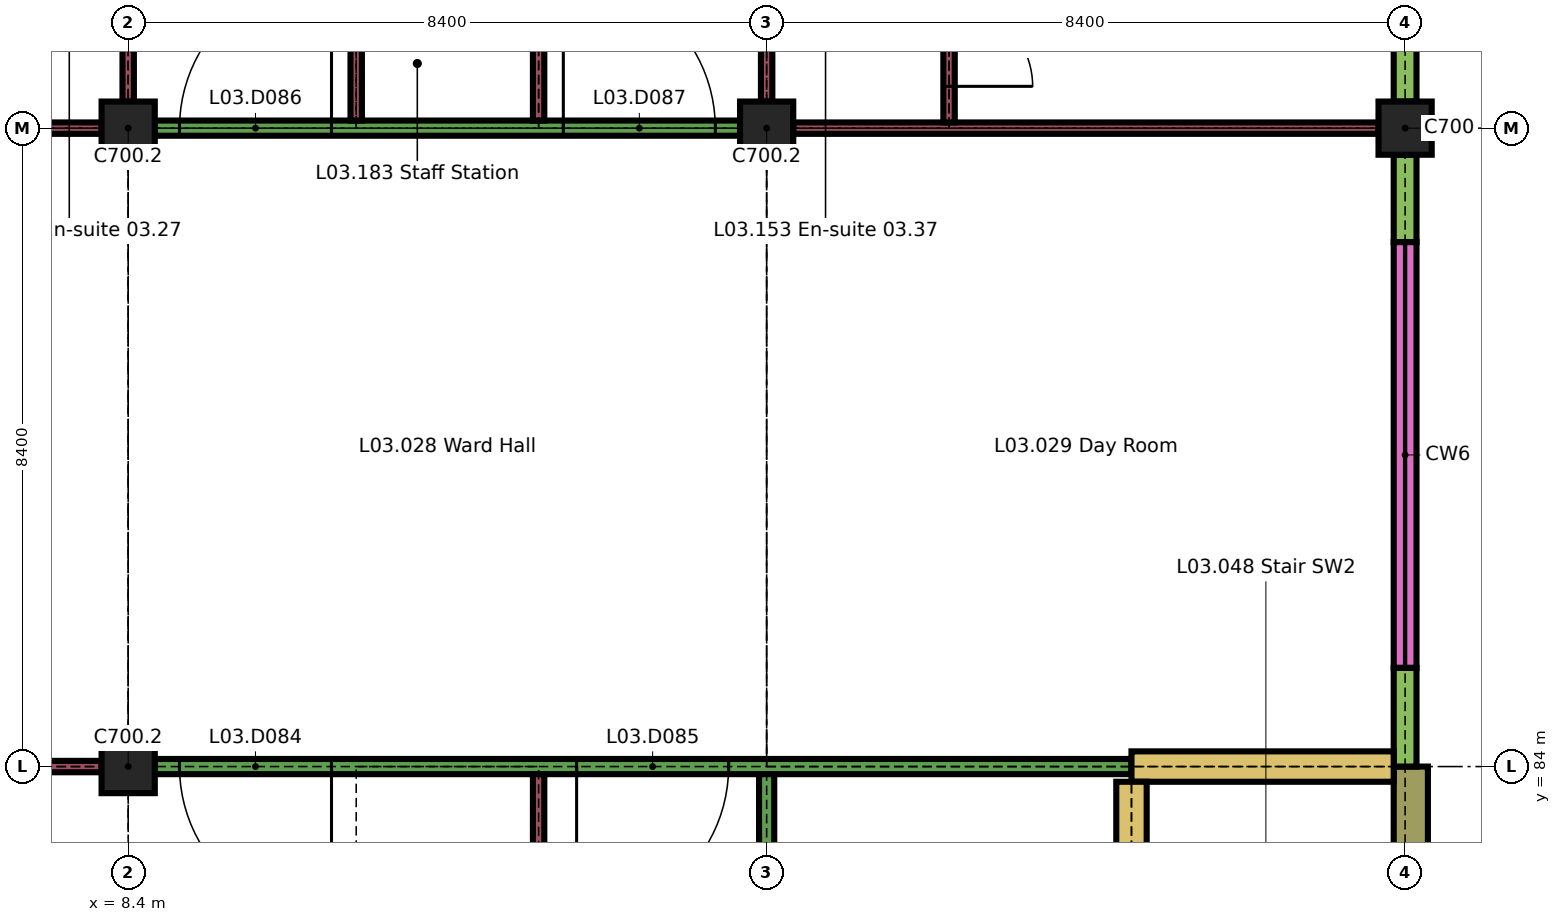
"""IFC4 building model, lengths in metres.
Left out: names, types, materials, properties, quantities, classifications, styles, units other than length and angle.
Written with IfcOpenShell. Run it as: python <this file> out.ifc"""

import sys

from ifc_helpers import new_model, si_unit, direction, frame, frame_2d, origin, origin_2d, place, context, subcontext, project, spatial, rectangle, extrude, element, fill, save


model = new_model("IFC4")
c1 = context("Model", 3, precision=1e-05, world=origin(), true_north=direction((0.0, 1.0)))
c2 = subcontext(c1, "Body", "Model", "MODEL_VIEW")
j1 = project(units=[si_unit("LENGTHUNIT", "METRE"), si_unit("PLANEANGLEUNIT", "RADIAN")], contexts=[c1])
p1 = place(None, origin())
s1 = spatial("IfcSite", under=j1, at=p1, CompositionType="ELEMENT")
p2 = place(p1, origin())
s2 = spatial("IfcBuilding", under=s1, at=p2, CompositionType="ELEMENT")
p3 = place(p2, frame((0.0, 0.0, 15.3)))
s3 = spatial("IfcBuildingStorey", under=s2, at=p3, CompositionType="ELEMENT", Elevation=15.3)
for number, where, z_axis, x_axis in (
    (1, (8.4, 84.0, 0.0), (0.0, 0.0, 1.0), (1.0, 0.0, 0.0)),
    (2, (8.4, 92.4, 0.0), (0.0, 0.0, 1.0), (1.0, 0.0, 0.0)),
    (3, (16.8, 92.4, 0.0), (0.0, 0.0, 1.0), (1.0, 0.0, 0.0)),
    (4, (25.2, 92.4, 0.0), (0.0, 0.0, 1.0), (1.0, 0.0, 0.0)),
):
    element("IfcColumn", number, at=place(p3, frame(where, z_axis=z_axis, x_axis=x_axis)), inside=s3, PredefinedType="COLUMN", context=c2, shape_type="SweptSolid", body=[
        extrude(rectangle(XDim=0.7, YDim=0.7, at=origin_2d()), origin(), (0.0, 0.0, 1.0), 3.26),
    ])
p4 = place(p3, frame((25.275, 80.15, 0.0), z_axis=(0.0, 0.0, 1.0), x_axis=(0.0, 1.0, 0.0)))
e5 = element("IfcWall", 5, at=p4, inside=s3, PredefinedType="SOLIDWALL", context=c2, shape_type="SweptSolid", body=[
    extrude(rectangle(XDim=3.85, YDim=0.45, at=frame_2d((1.925, 0.0))), origin(), (0.0, 0.0, 1.0), 3.26),
])
p5 = place(p3, frame((25.2, 84.0, 0.0), z_axis=(0.0, 0.0, 1.0), x_axis=(0.0, 1.0, 0.0)))
e6 = element("IfcWall", 6, at=p5, inside=s3, PredefinedType="SOLIDWALL", context=c2, shape_type="SweptSolid", body=[
    extrude(rectangle(XDim=1.3, YDim=0.3, at=frame_2d((0.65, 0.0))), origin(), (0.0, 0.0, 1.0), 2.96),
])
p6 = place(p3, frame((25.2, 90.9, 0.0), z_axis=(0.0, 0.0, 1.0), x_axis=(0.0, 1.0, 0.0)))
e7 = element("IfcWall", 7, at=p6, inside=s3, PredefinedType="SOLIDWALL", context=c2, shape_type="SweptSolid", body=[
    extrude(rectangle(XDim=1.15, YDim=0.3, at=frame_2d((0.575, 0.0))), origin(), (0.0, 0.0, 1.0), 2.96),
])
p7 = place(p3, frame((25.2, 85.3, 0.0), z_axis=(0.0, 0.0, 1.0), x_axis=(0.0, 1.0, 0.0)))
e8 = element("IfcWall", 8, at=p7, inside=s3, PredefinedType="SOLIDWALL", context=c2, shape_type="SweptSolid", body=[
    extrude(rectangle(XDim=5.6, YDim=0.3, at=frame_2d((2.8, 0.0))), origin(), (0.0, 0.0, 1.0), 0.6),
])
p8 = place(p3, frame((25.2, 92.75, 0.0), z_axis=(0.0, 0.0, 1.0), x_axis=(0.0, 1.0, 0.0)))
e9 = element("IfcWall", 9, at=p8, inside=s3, PredefinedType="SOLIDWALL", context=c2, shape_type="SweptSolid", body=[
    extrude(rectangle(XDim=3.85, YDim=0.3, at=frame_2d((1.925, 0.0))), origin(), (0.0, 0.0, 1.0), 2.96),
])
p9 = place(p8, frame((0.7, 0.0, 0.9)))
e10 = element("IfcOpeningElement", 10, at=p9, cuts=e9, PredefinedType="OPENING", context=c2, shape_type="SweptSolid", body=[
    extrude(rectangle(XDim=2.1, YDim=1.5, at=frame_2d((1.05, 0.75))), frame((0.0, 0.16, 0.0), z_axis=(0.0, -1.0, 0.0), x_axis=(1.0, 0.0, 0.0)), (0.0, 0.0, 1.0), 0.32),
])
p10 = place(p3, frame((0.35, 84.0, 0.0), z_axis=(0.0, 0.0, 1.0), x_axis=(1.0, 0.0, 0.0)))
e11 = element("IfcWall", 11, at=p10, inside=s3, PredefinedType="PARTITIONING", context=c2, shape_type="SweptSolid", body=[
    extrude(rectangle(XDim=7.7, YDim=0.15, at=frame_2d((3.85, 0.0))), origin(), (0.0, 0.0, 1.0), 3.26),
])
p11 = place(p3, frame((8.75, 84.0, 0.0), z_axis=(0.0, 0.0, 1.0), x_axis=(1.0, 0.0, 0.0)))
e12 = element("IfcWall", 12, at=p11, inside=s3, PredefinedType="PARTITIONING", context=c2, shape_type="SweptSolid", body=[
    extrude(rectangle(XDim=12.85, YDim=0.2, at=frame_2d((6.425, 0.0))), origin(), (0.0, 0.0, 1.0), 3.26),
])
p12 = place(p11, frame((0.325, 0.0, 0.0)))
e13 = element("IfcOpeningElement", 13, at=p12, cuts=e12, PredefinedType="OPENING", context=c2, shape_type="SweptSolid", body=[
    extrude(rectangle(XDim=2.0, YDim=2.4, at=frame_2d((1.0, 1.2))), frame((0.0, 0.11, 0.0), z_axis=(0.0, -1.0, 0.0), x_axis=(1.0, 0.0, 0.0)), (0.0, 0.0, 1.0), 0.22),
])
p13 = place(p11, frame((5.55, 0.0, 0.0)))
e14 = element("IfcOpeningElement", 14, at=p13, cuts=e12, PredefinedType="OPENING", context=c2, shape_type="SweptSolid", body=[
    extrude(rectangle(XDim=2.0, YDim=2.4, at=frame_2d((1.0, 1.2))), frame((0.0, 0.11, 0.0), z_axis=(0.0, -1.0, 0.0), x_axis=(1.0, 0.0, 0.0)), (0.0, 0.0, 1.0), 0.22),
])
p14 = place(p3, frame((21.6, 84.0, 0.0), z_axis=(0.0, 0.0, 1.0), x_axis=(1.0, 0.0, 0.0)))
e15 = element("IfcWall", 15, at=p14, inside=s3, PredefinedType="SHEAR", context=c2, shape_type="SweptSolid", body=[
    extrude(rectangle(XDim=3.45, YDim=0.4, at=frame_2d((1.725, 0.0))), origin(), (0.0, 0.0, 1.0), 3.26),
])
p15 = place(p3, frame((0.35, 92.4, 0.0), z_axis=(0.0, 0.0, 1.0), x_axis=(1.0, 0.0, 0.0)))
e16 = element("IfcWall", 16, at=p15, inside=s3, PredefinedType="PARTITIONING", context=c2, shape_type="SweptSolid", body=[
    extrude(rectangle(XDim=7.7, YDim=0.15, at=frame_2d((3.85, 0.0))), origin(), (0.0, 0.0, 1.0), 3.26),
])
p16 = place(p3, frame((8.75, 92.4, 0.0), z_axis=(0.0, 0.0, 1.0), x_axis=(1.0, 0.0, 0.0)))
e17 = element("IfcWall", 17, at=p16, inside=s3, PredefinedType="PARTITIONING", context=c2, shape_type="SweptSolid", body=[
    extrude(rectangle(XDim=7.7, YDim=0.2, at=frame_2d((3.85, 0.0))), origin(), (0.0, 0.0, 1.0), 3.26),
])
p17 = place(p16, frame((0.325, 0.0, 0.0)))
e18 = element("IfcOpeningElement", 18, at=p17, cuts=e17, PredefinedType="OPENING", context=c2, shape_type="SweptSolid", body=[
    extrude(rectangle(XDim=2.0, YDim=2.4, at=frame_2d((1.0, 1.2))), frame((0.0, 0.11, 0.0), z_axis=(0.0, -1.0, 0.0), x_axis=(1.0, 0.0, 0.0)), (0.0, 0.0, 1.0), 0.22),
])
p18 = place(p16, frame((5.375, 0.0, 0.0)))
e19 = element("IfcOpeningElement", 19, at=p18, cuts=e17, PredefinedType="OPENING", context=c2, shape_type="SweptSolid", body=[
    extrude(rectangle(XDim=2.0, YDim=2.4, at=frame_2d((1.0, 1.2))), frame((0.0, 0.11, 0.0), z_axis=(0.0, -1.0, 0.0), x_axis=(1.0, 0.0, 0.0)), (0.0, 0.0, 1.0), 0.22),
])
p19 = place(p3, frame((17.15, 92.4, 0.0), z_axis=(0.0, 0.0, 1.0), x_axis=(1.0, 0.0, 0.0)))
e20 = element("IfcWall", 20, at=p19, inside=s3, PredefinedType="PARTITIONING", context=c2, shape_type="SweptSolid", body=[
    extrude(rectangle(XDim=7.7, YDim=0.15, at=frame_2d((3.85, 0.0))), origin(), (0.0, 0.0, 1.0), 3.26),
])
p20 = place(p3, frame((8.4, 92.75, 0.0), z_axis=(0.0, 0.0, 1.0), x_axis=(0.0, 1.0, 0.0)))
e21 = element("IfcWall", 21, at=p20, inside=s3, PredefinedType="PARTITIONING", context=c2, shape_type="SweptSolid", body=[
    extrude(rectangle(XDim=7.7, YDim=0.15, at=frame_2d((3.85, 0.0))), origin(), (0.0, 0.0, 1.0), 3.26),
])
p21 = place(p20, frame((2.1, 0.0, 0.0)))
e22 = element("IfcOpeningElement", 22, at=p21, cuts=e21, PredefinedType="OPENING", context=c2, shape_type="SweptSolid", body=[
    extrude(rectangle(XDim=1.5, YDim=2.4, at=frame_2d((0.75, 1.2))), frame((0.0, 0.085, 0.0), z_axis=(0.0, -1.0, 0.0), x_axis=(1.0, 0.0, 0.0)), (0.0, 0.0, 1.0), 0.17),
])
p22 = place(p20, frame((4.1, 0.0, 0.0)))
e23 = element("IfcOpeningElement", 23, at=p22, cuts=e21, PredefinedType="OPENING", context=c2, shape_type="SweptSolid", body=[
    extrude(rectangle(XDim=1.5, YDim=2.4, at=frame_2d((0.75, 1.2))), frame((0.0, 0.085, 0.0), z_axis=(0.0, -1.0, 0.0), x_axis=(1.0, 0.0, 0.0)), (0.0, 0.0, 1.0), 0.17),
])
p23 = place(p3, frame((11.4, 92.5, 0.0), z_axis=(0.0, 0.0, 1.0), x_axis=(0.0, 1.0, 0.0)))
e24 = element("IfcWall", 24, at=p23, inside=s3, PredefinedType="PARTITIONING", context=c2, shape_type="SweptSolid", body=[
    extrude(rectangle(XDim=13.625, YDim=0.15, at=frame_2d((6.812, 0.0))), origin(), (0.0, 0.0, 1.0), 3.26),
])
p24 = place(p23, frame((4.95, 0.0, 0.0)))
e25 = element("IfcOpeningElement", 25, at=p24, cuts=e24, PredefinedType="OPENING", context=c2, shape_type="SweptSolid", body=[
    extrude(rectangle(XDim=1.1, YDim=2.1, at=frame_2d((0.55, 1.05))), frame((0.0, 0.085, 0.0), z_axis=(0.0, -1.0, 0.0), x_axis=(1.0, 0.0, 0.0)), (0.0, 0.0, 1.0), 0.17),
])
p25 = place(p23, frame((7.75, 0.0, 0.0)))
e26 = element("IfcOpeningElement", 26, at=p25, cuts=e24, PredefinedType="OPENING", context=c2, shape_type="SweptSolid", body=[
    extrude(rectangle(XDim=1.1, YDim=2.1, at=frame_2d((0.55, 1.05))), frame((0.0, 0.085, 0.0), z_axis=(0.0, -1.0, 0.0), x_axis=(1.0, 0.0, 0.0)), (0.0, 0.0, 1.0), 0.17),
])
p26 = place(p3, frame((13.8, 33.7, 0.0), z_axis=(0.0, 0.0, 1.0), x_axis=(0.0, 1.0, 0.0)))
e27 = element("IfcWall", 27, at=p26, inside=s3, PredefinedType="PARTITIONING", context=c2, shape_type="SweptSolid", body=[
    extrude(rectangle(XDim=50.2, YDim=0.15, at=frame_2d((25.1, 0.0))), origin(), (0.0, 0.0, 1.0), 3.26),
])
p27 = place(p26, frame((9.8, 0.0, 0.0)))
e28 = element("IfcOpeningElement", 28, at=p27, cuts=e27, PredefinedType="OPENING", context=c2, shape_type="SweptSolid", body=[
    extrude(rectangle(XDim=1.2, YDim=2.1, at=frame_2d((0.6, 1.05))), frame((0.0, 0.085, 0.0), z_axis=(0.0, -1.0, 0.0), x_axis=(1.0, 0.0, 0.0)), (0.0, 0.0, 1.0), 0.17),
])
p28 = place(p26, frame((14.0, 0.0, 0.0)))
e29 = element("IfcOpeningElement", 29, at=p28, cuts=e27, PredefinedType="OPENING", context=c2, shape_type="SweptSolid", body=[
    extrude(rectangle(XDim=1.2, YDim=2.1, at=frame_2d((0.6, 1.05))), frame((0.0, 0.085, 0.0), z_axis=(0.0, -1.0, 0.0), x_axis=(1.0, 0.0, 0.0)), (0.0, 0.0, 1.0), 0.17),
])
p29 = place(p26, frame((21.85, 0.0, 0.0)))
e30 = element("IfcOpeningElement", 30, at=p29, cuts=e27, PredefinedType="OPENING", context=c2, shape_type="SweptSolid", body=[
    extrude(rectangle(XDim=0.9, YDim=2.1, at=frame_2d((0.45, 1.05))), frame((0.0, 0.085, 0.0), z_axis=(0.0, -1.0, 0.0), x_axis=(1.0, 0.0, 0.0)), (0.0, 0.0, 1.0), 0.17),
])
p30 = place(p26, frame((33.6, 0.0, 0.0)))
e31 = element("IfcOpeningElement", 31, at=p30, cuts=e27, PredefinedType="OPENING", context=c2, shape_type="SweptSolid", body=[
    extrude(rectangle(XDim=1.2, YDim=2.1, at=frame_2d((0.6, 1.05))), frame((0.0, 0.085, 0.0), z_axis=(0.0, -1.0, 0.0), x_axis=(1.0, 0.0, 0.0)), (0.0, 0.0, 1.0), 0.17),
])
p31 = place(p26, frame((37.8, 0.0, 0.0)))
e32 = element("IfcOpeningElement", 32, at=p31, cuts=e27, PredefinedType="OPENING", context=c2, shape_type="SweptSolid", body=[
    extrude(rectangle(XDim=1.2, YDim=2.1, at=frame_2d((0.6, 1.05))), frame((0.0, 0.085, 0.0), z_axis=(0.0, -1.0, 0.0), x_axis=(1.0, 0.0, 0.0)), (0.0, 0.0, 1.0), 0.17),
])
p32 = place(p26, frame((45.65, 0.0, 0.0)))
e33 = element("IfcOpeningElement", 33, at=p32, cuts=e27, PredefinedType="OPENING", context=c2, shape_type="SweptSolid", body=[
    extrude(rectangle(XDim=0.9, YDim=2.1, at=frame_2d((0.45, 1.05))), frame((0.0, 0.085, 0.0), z_axis=(0.0, -1.0, 0.0), x_axis=(1.0, 0.0, 0.0)), (0.0, 0.0, 1.0), 0.17),
])
p33 = place(p3, frame((13.8, 92.5, 0.0), z_axis=(0.0, 0.0, 1.0), x_axis=(0.0, 1.0, 0.0)))
e34 = element("IfcWall", 34, at=p33, inside=s3, PredefinedType="PARTITIONING", context=c2, shape_type="SweptSolid", body=[
    extrude(rectangle(XDim=13.625, YDim=0.15, at=frame_2d((6.812, 0.0))), origin(), (0.0, 0.0, 1.0), 3.26),
])
p34 = place(p33, frame((1.5, 0.0, 0.0)))
e35 = element("IfcOpeningElement", 35, at=p34, cuts=e34, PredefinedType="OPENING", context=c2, shape_type="SweptSolid", body=[
    extrude(rectangle(XDim=1.1, YDim=2.1, at=frame_2d((0.55, 1.05))), frame((0.0, 0.085, 0.0), z_axis=(0.0, -1.0, 0.0), x_axis=(1.0, 0.0, 0.0)), (0.0, 0.0, 1.0), 0.17),
])
p35 = place(p33, frame((11.062, 0.0, 0.0)))
e36 = element("IfcOpeningElement", 36, at=p35, cuts=e34, PredefinedType="OPENING", context=c2, shape_type="SweptSolid", body=[
    extrude(rectangle(XDim=1.2, YDim=2.1, at=frame_2d((0.6, 1.05))), frame((0.0, 0.085, 0.0), z_axis=(0.0, -1.0, 0.0), x_axis=(1.0, 0.0, 0.0)), (0.0, 0.0, 1.0), 0.17),
])
p36 = place(p3, frame((16.8, 75.6, 0.0), z_axis=(0.0, 0.0, 1.0), x_axis=(0.0, 1.0, 0.0)))
e37 = element("IfcWall", 37, at=p36, inside=s3, PredefinedType="PARTITIONING", context=c2, shape_type="SweptSolid", body=[
    extrude(rectangle(XDim=8.3, YDim=0.2, at=frame_2d((4.15, 0.0))), origin(), (0.0, 0.0, 1.0), 3.26),
])
p37 = place(p36, frame((3.15, 0.0, 0.0)))
e38 = element("IfcOpeningElement", 38, at=p37, cuts=e37, PredefinedType="OPENING", context=c2, shape_type="SweptSolid", body=[
    extrude(rectangle(XDim=2.0, YDim=2.4, at=frame_2d((1.0, 1.2))), frame((0.0, 0.11, 0.0), z_axis=(0.0, -1.0, 0.0), x_axis=(1.0, 0.0, 0.0)), (0.0, 0.0, 1.0), 0.22),
])
p38 = place(p3, frame((16.8, 92.75, 0.0), z_axis=(0.0, 0.0, 1.0), x_axis=(0.0, 1.0, 0.0)))
e39 = element("IfcWall", 39, at=p38, inside=s3, PredefinedType="PARTITIONING", context=c2, shape_type="SweptSolid", body=[
    extrude(rectangle(XDim=7.7, YDim=0.15, at=frame_2d((3.85, 0.0))), origin(), (0.0, 0.0, 1.0), 3.26),
])
p39 = place(p38, frame((2.1, 0.0, 0.0)))
e40 = element("IfcOpeningElement", 40, at=p39, cuts=e39, PredefinedType="OPENING", context=c2, shape_type="SweptSolid", body=[
    extrude(rectangle(XDim=1.5, YDim=2.4, at=frame_2d((0.75, 1.2))), frame((0.0, 0.085, 0.0), z_axis=(0.0, -1.0, 0.0), x_axis=(1.0, 0.0, 0.0)), (0.0, 0.0, 1.0), 0.17),
])
p40 = place(p38, frame((4.1, 0.0, 0.0)))
e41 = element("IfcOpeningElement", 41, at=p40, cuts=e39, PredefinedType="OPENING", context=c2, shape_type="SweptSolid", body=[
    extrude(rectangle(XDim=1.5, YDim=2.4, at=frame_2d((0.75, 1.2))), frame((0.0, 0.085, 0.0), z_axis=(0.0, -1.0, 0.0), x_axis=(1.0, 0.0, 0.0)), (0.0, 0.0, 1.0), 0.17),
])
p41 = place(p3, frame((19.2, 92.475, 0.0), z_axis=(0.0, 0.0, 1.0), x_axis=(0.0, 1.0, 0.0)))
e42 = element("IfcWall", 42, at=p41, inside=s3, PredefinedType="PARTITIONING", context=c2, shape_type="SweptSolid", body=[
    extrude(rectangle(XDim=2.05, YDim=0.15, at=frame_2d((1.025, 0.0))), origin(), (0.0, 0.0, 1.0), 3.26),
])
p42 = place(p41, frame((0.475, 0.0, 0.0)))
e43 = element("IfcOpeningElement", 43, at=p42, cuts=e42, PredefinedType="OPENING", context=c2, shape_type="SweptSolid", body=[
    extrude(rectangle(XDim=1.1, YDim=2.1, at=frame_2d((0.55, 1.05))), frame((0.0, 0.085, 0.0), z_axis=(0.0, -1.0, 0.0), x_axis=(1.0, 0.0, 0.0)), (0.0, 0.0, 1.0), 0.17),
])
p43 = place(p3, frame((21.6, 75.8, 0.0), z_axis=(0.0, 0.0, 1.0), x_axis=(0.0, 1.0, 0.0)))
e44 = element("IfcWall", 44, at=p43, inside=s3, PredefinedType="SHEAR", context=c2, shape_type="SweptSolid", body=[
    extrude(rectangle(XDim=8.0, YDim=0.4, at=frame_2d((4.0, 0.0))), origin(), (0.0, 0.0, 1.0), 3.26),
])
p44 = place(p43, frame((0.4, 0.0, 0.0)))
e45 = element("IfcOpeningElement", 45, at=p44, cuts=e44, PredefinedType="OPENING", context=c2, shape_type="SweptSolid", body=[
    extrude(rectangle(XDim=1.2, YDim=2.1, at=frame_2d((0.6, 1.05))), frame((0.0, 0.21, 0.0), z_axis=(0.0, -1.0, 0.0), x_axis=(1.0, 0.0, 0.0)), (0.0, 0.0, 1.0), 0.42),
])
p45 = place(p12, origin())
e46 = element("IfcDoor", 46, at=p45, inside=s3, OperationType="SINGLE_SWING_RIGHT", PredefinedType="DOOR", context=c2, shape_type="SweptSolid", body=[
    extrude(rectangle(XDim=2.0, YDim=2.4, at=frame_2d((1.0, 1.2))), frame((0.0, 0.03, 0.0), z_axis=(0.0, -1.0, 0.0), x_axis=(1.0, 0.0, 0.0)), (0.0, 0.0, 1.0), 0.06),
])
fill(e13, e46)
p46 = place(p13, origin())
e47 = element("IfcDoor", 47, at=p46, inside=s3, OperationType="SINGLE_SWING_LEFT", PredefinedType="DOOR", context=c2, shape_type="SweptSolid", body=[
    extrude(rectangle(XDim=2.0, YDim=2.4, at=frame_2d((1.0, 1.2))), frame((0.0, 0.03, 0.0), z_axis=(0.0, -1.0, 0.0), x_axis=(1.0, 0.0, 0.0)), (0.0, 0.0, 1.0), 0.06),
])
fill(e14, e47)
p47 = place(p17, origin())
e48 = element("IfcDoor", 48, at=p47, inside=s3, OperationType="SINGLE_SWING_LEFT", PredefinedType="DOOR", context=c2, shape_type="SweptSolid", body=[
    extrude(rectangle(XDim=2.0, YDim=2.4, at=frame_2d((1.0, 1.2))), frame((0.0, 0.03, 0.0), z_axis=(0.0, -1.0, 0.0), x_axis=(1.0, 0.0, 0.0)), (0.0, 0.0, 1.0), 0.06),
])
fill(e18, e48)
p48 = place(p18, origin())
e49 = element("IfcDoor", 49, at=p48, inside=s3, OperationType="SINGLE_SWING_RIGHT", PredefinedType="DOOR", context=c2, shape_type="SweptSolid", body=[
    extrude(rectangle(XDim=2.0, YDim=2.4, at=frame_2d((1.0, 1.2))), frame((0.0, 0.03, 0.0), z_axis=(0.0, -1.0, 0.0), x_axis=(1.0, 0.0, 0.0)), (0.0, 0.0, 1.0), 0.06),
])
fill(e19, e49)
p49 = place(p42, origin())
e50 = element("IfcDoor", 50, at=p49, inside=s3, OperationType="SINGLE_SWING_LEFT", PredefinedType="DOOR", context=c2, shape_type="SweptSolid", body=[
    extrude(rectangle(XDim=1.1, YDim=2.1, at=frame_2d((0.55, 1.05))), frame((0.0, 0.025, 0.0), z_axis=(0.0, -1.0, 0.0), x_axis=(1.0, 0.0, 0.0)), (0.0, 0.0, 1.0), 0.05),
])
fill(e43, e50)
save(model, sys.argv[1])
